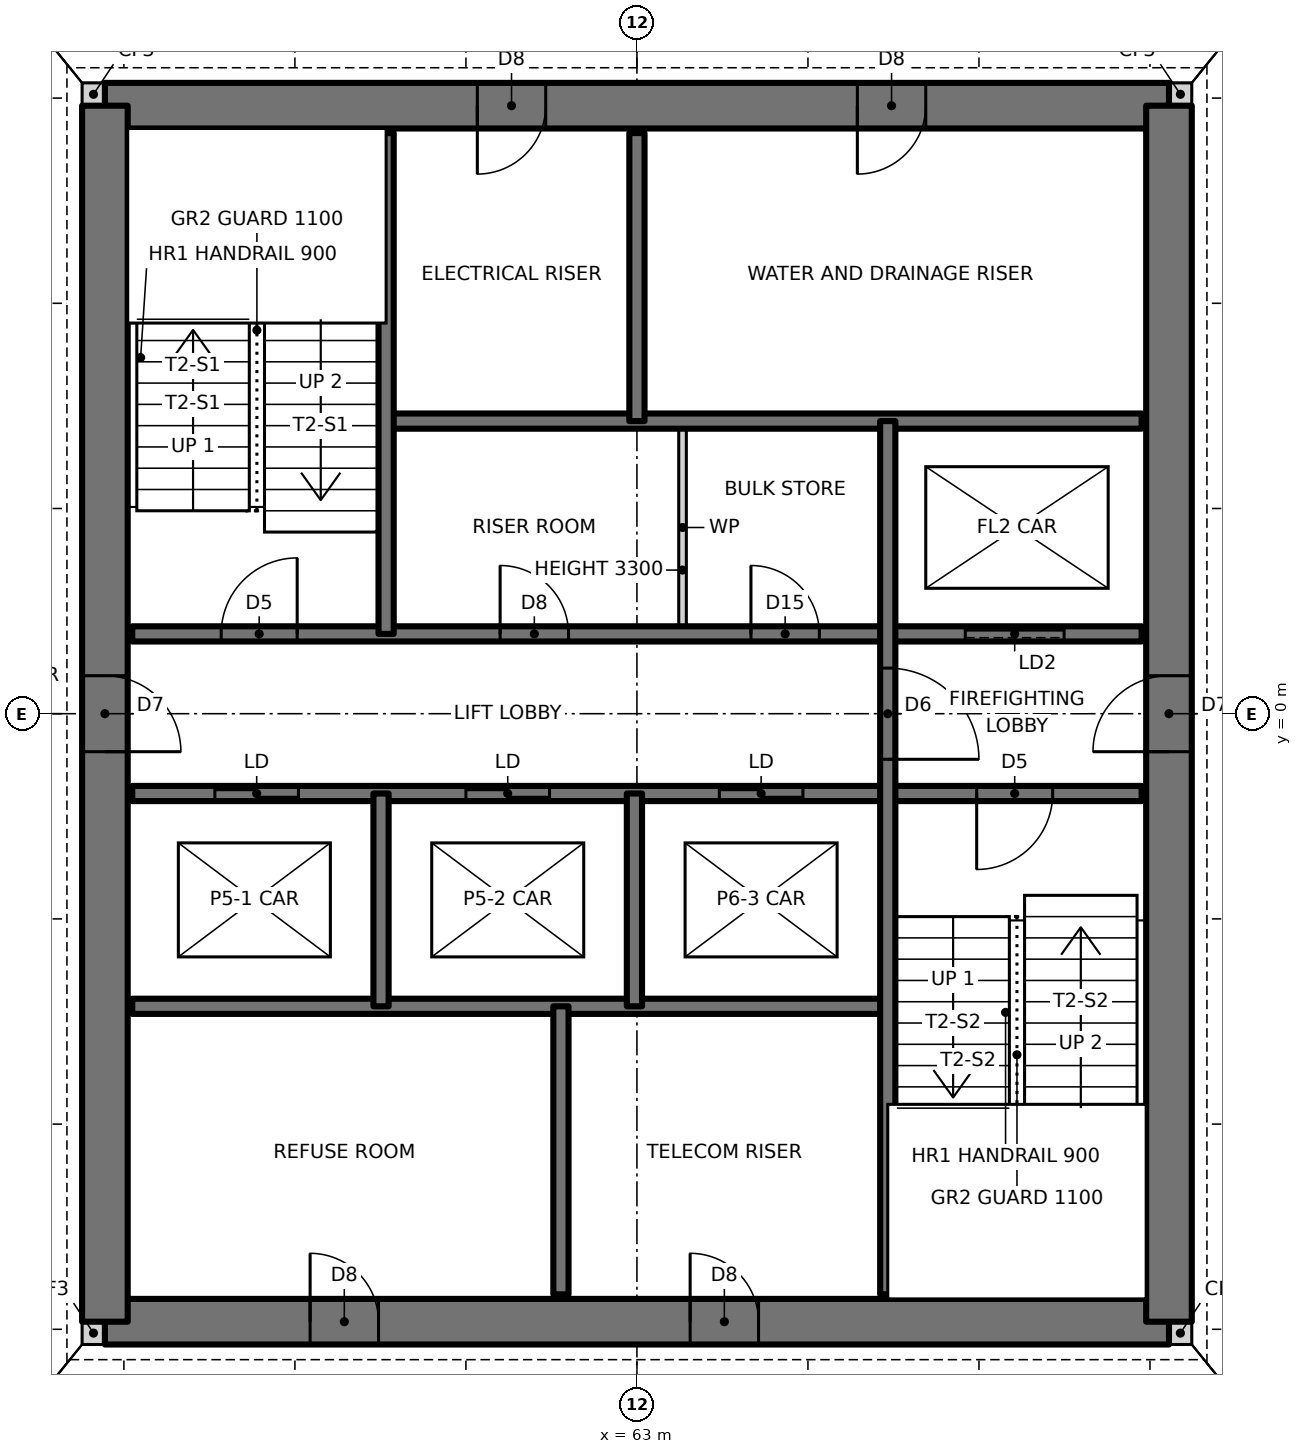
"""IFC4 building model, lengths in metres.
Left out: names, types, materials, properties, quantities, classifications, styles, units other than length and angle.
Written with IfcOpenShell. Run it as: python <this file> out.ifc"""

import sys

from ifc_helpers import new_model, si_unit, direction, frame, frame_2d, origin, place, context, subcontext, project, spatial, rectangle, extrude, element, fill, save


model = new_model("IFC4")
c1 = context("Model", 3, precision=1e-05, world=origin(), true_north=direction((0.0, 1.0)))
c2 = subcontext(c1, "Body", "Model", "MODEL_VIEW")
j1 = project(units=[si_unit("LENGTHUNIT", "METRE"), si_unit("PLANEANGLEUNIT", "RADIAN")], contexts=[c1])
p1 = place(None, origin())
s1 = spatial("IfcSite", under=j1, at=p1, CompositionType="ELEMENT")
p2 = place(p1, origin())
s2 = spatial("IfcBuilding", under=s1, at=p2, CompositionType="ELEMENT")
p3 = place(p2, frame((0.0, 0.0, 91.0)))
s3 = spatial("IfcBuildingStorey", under=s2, at=p3, CompositionType="ELEMENT", Elevation=91.0)
for number, where, z_axis, x_axis in (
    (1, (55.7, -8.15, 0.0), (0.0, 0.0, 1.0), (1.0, 0.0, 0.0)),
    (2, (70.0, -8.15, 0.0), (0.0, 0.0, 1.0), (1.0, 0.0, 0.0)),
    (3, (70.0, 8.15, 0.0), (0.0, 0.0, 1.0), (1.0, 0.0, 0.0)),
    (4, (55.7, 8.15, 0.0), (0.0, 0.0, 1.0), (1.0, 0.0, 0.0)),
):
    element("IfcWall", number, at=place(p3, frame(where, z_axis=z_axis, x_axis=x_axis)), inside=s3, PredefinedType="SOLIDWALL", context=c2, shape_type="SweptSolid", body=[
        extrude(rectangle(XDim=0.3, YDim=0.3, at=frame_2d((0.15, 0.0))), origin(), (0.0, 0.0, 1.0), 3.5),
    ])
p4 = place(p3, frame((56.0, -8.0, 0.0), z_axis=(0.0, 0.0, 1.0), x_axis=(1.0, 0.0, 0.0)))
e5 = element("IfcWall", 5, at=p4, inside=s3, PredefinedType="SHEAR", context=c2, shape_type="SweptSolid", body=[
    extrude(rectangle(XDim=14.0, YDim=0.6, at=frame_2d((7.0, 0.0))), origin(), (0.0, 0.0, 1.0), 3.5),
])
p5 = place(p4, frame((2.7, 0.0, 0.0)))
e6 = element("IfcOpeningElement", 6, at=p5, cuts=e5, PredefinedType="OPENING", context=c2, shape_type="SweptSolid", body=[
    extrude(rectangle(XDim=0.9, YDim=2.1, at=frame_2d((0.45, 1.05))), frame((0.0, 0.31, 0.0), z_axis=(0.0, -1.0, 0.0), x_axis=(1.0, 0.0, 0.0)), (0.0, 0.0, 1.0), 0.62),
])
p6 = place(p4, frame((7.7, 0.0, 0.0)))
e7 = element("IfcOpeningElement", 7, at=p6, cuts=e5, PredefinedType="OPENING", context=c2, shape_type="SweptSolid", body=[
    extrude(rectangle(XDim=0.9, YDim=2.1, at=frame_2d((0.45, 1.05))), frame((0.0, 0.31, 0.0), z_axis=(0.0, -1.0, 0.0), x_axis=(1.0, 0.0, 0.0)), (0.0, 0.0, 1.0), 0.62),
])
p7 = place(p3, frame((70.0, 8.0, 0.0), z_axis=(0.0, 0.0, 1.0), x_axis=(-1.0, 0.0, 0.0)))
e8 = element("IfcWall", 8, at=p7, inside=s3, PredefinedType="SHEAR", context=c2, shape_type="SweptSolid", body=[
    extrude(rectangle(XDim=14.0, YDim=0.6, at=frame_2d((7.0, 0.0))), origin(), (0.0, 0.0, 1.0), 3.5),
])
p8 = place(p7, frame((8.2, 0.0, 0.0)))
e9 = element("IfcOpeningElement", 9, at=p8, cuts=e8, PredefinedType="OPENING", context=c2, shape_type="SweptSolid", body=[
    extrude(rectangle(XDim=0.9, YDim=2.1, at=frame_2d((0.45, 1.05))), frame((0.0, 0.31, 0.0), z_axis=(0.0, -1.0, 0.0), x_axis=(1.0, 0.0, 0.0)), (0.0, 0.0, 1.0), 0.62),
])
p9 = place(p7, frame((3.2, 0.0, 0.0)))
e10 = element("IfcOpeningElement", 10, at=p9, cuts=e8, PredefinedType="OPENING", context=c2, shape_type="SweptSolid", body=[
    extrude(rectangle(XDim=0.9, YDim=2.1, at=frame_2d((0.45, 1.05))), frame((0.0, 0.31, 0.0), z_axis=(0.0, -1.0, 0.0), x_axis=(1.0, 0.0, 0.0)), (0.0, 0.0, 1.0), 0.62),
])
p10 = place(p3, frame((70.0, -8.0, 0.0), z_axis=(0.0, 0.0, 1.0), x_axis=(0.0, 1.0, 0.0)))
e11 = element("IfcWall", 11, at=p10, inside=s3, PredefinedType="SHEAR", context=c2, shape_type="SweptSolid", body=[
    extrude(rectangle(XDim=16.0, YDim=0.6, at=frame_2d((8.0, 0.0))), origin(), (0.0, 0.0, 1.0), 3.5),
])
p11 = place(p10, frame((7.5, 0.0, 0.0)))
e12 = element("IfcOpeningElement", 12, at=p11, cuts=e11, PredefinedType="OPENING", context=c2, shape_type="SweptSolid", body=[
    extrude(rectangle(XDim=1.0, YDim=2.1, at=frame_2d((0.5, 1.05))), frame((0.0, 0.31, 0.0), z_axis=(0.0, -1.0, 0.0), x_axis=(1.0, 0.0, 0.0)), (0.0, 0.0, 1.0), 0.62),
])
p12 = place(p3, frame((56.0, 8.0, 0.0), z_axis=(0.0, 0.0, 1.0), x_axis=(0.0, -1.0, 0.0)))
e13 = element("IfcWall", 13, at=p12, inside=s3, PredefinedType="SHEAR", context=c2, shape_type="SweptSolid", body=[
    extrude(rectangle(XDim=16.0, YDim=0.6, at=frame_2d((8.0, 0.0))), origin(), (0.0, 0.0, 1.0), 3.5),
])
p13 = place(p12, frame((7.5, 0.0, 0.0)))
e14 = element("IfcOpeningElement", 14, at=p13, cuts=e13, PredefinedType="OPENING", context=c2, shape_type="SweptSolid", body=[
    extrude(rectangle(XDim=1.0, YDim=2.1, at=frame_2d((0.5, 1.05))), frame((0.0, 0.31, 0.0), z_axis=(0.0, -1.0, 0.0), x_axis=(1.0, 0.0, 0.0)), (0.0, 0.0, 1.0), 0.62),
])
p14 = place(p3, frame((56.36, -3.85, 0.0), z_axis=(0.0, 0.0, 1.0), x_axis=(1.0, 0.0, 0.0)))
e15 = element("IfcWall", 15, at=p14, inside=s3, PredefinedType="SOLIDWALL", context=c2, shape_type="SweptSolid", body=[
    extrude(rectangle(XDim=9.94, YDim=0.2, at=frame_2d((4.97, 0.0))), origin(), (0.0, 0.0, 1.0), 3.5),
])
p15 = place(p3, frame((56.36, -1.05, 0.0), z_axis=(0.0, 0.0, 1.0), x_axis=(1.0, 0.0, 0.0)))
e16 = element("IfcWall", 16, at=p15, inside=s3, PredefinedType="SOLIDWALL", context=c2, shape_type="SweptSolid", body=[
    extrude(rectangle(XDim=13.28, YDim=0.2, at=frame_2d((6.64, 0.0))), origin(), (0.0, 0.0, 1.0), 3.5),
])
p16 = place(p15, frame((11.11, 0.0, 0.0)))
e17 = element("IfcOpeningElement", 17, at=p16, cuts=e16, PredefinedType="OPENING", context=c2, shape_type="SweptSolid", body=[
    extrude(rectangle(XDim=1.0, YDim=2.1, at=frame_2d((0.5, 1.05))), frame((0.0, 0.11, 0.0), z_axis=(0.0, -1.0, 0.0), x_axis=(1.0, 0.0, 0.0)), (0.0, 0.0, 1.0), 0.22),
])
p17 = place(p15, frame((1.087, 0.0, 0.0)))
e18 = element("IfcOpeningElement", 18, at=p17, cuts=e16, PredefinedType="OPENING", context=c2, shape_type="SweptSolid", body=[
    extrude(rectangle(XDim=1.1, YDim=2.1, at=frame_2d((0.55, 1.05))), frame((0.0, 0.11, 0.0), z_axis=(0.0, -1.0, 0.0), x_axis=(1.0, 0.0, 0.0)), (0.0, 0.0, 1.0), 0.22),
])
p18 = place(p15, frame((4.39, 0.0, 0.0)))
e19 = element("IfcOpeningElement", 19, at=p18, cuts=e16, PredefinedType="OPENING", context=c2, shape_type="SweptSolid", body=[
    extrude(rectangle(XDim=1.1, YDim=2.1, at=frame_2d((0.55, 1.05))), frame((0.0, 0.11, 0.0), z_axis=(0.0, -1.0, 0.0), x_axis=(1.0, 0.0, 0.0)), (0.0, 0.0, 1.0), 0.22),
])
p19 = place(p15, frame((7.724, 0.0, 0.0)))
e20 = element("IfcOpeningElement", 20, at=p19, cuts=e16, PredefinedType="OPENING", context=c2, shape_type="SweptSolid", body=[
    extrude(rectangle(XDim=1.1, YDim=2.1, at=frame_2d((0.55, 1.05))), frame((0.0, 0.11, 0.0), z_axis=(0.0, -1.0, 0.0), x_axis=(1.0, 0.0, 0.0)), (0.0, 0.0, 1.0), 0.22),
])
p20 = place(p3, frame((56.36, 1.05, 0.0), z_axis=(0.0, 0.0, 1.0), x_axis=(1.0, 0.0, 0.0)))
e21 = element("IfcWall", 21, at=p20, inside=s3, PredefinedType="SOLIDWALL", context=c2, shape_type="SweptSolid", body=[
    extrude(rectangle(XDim=13.28, YDim=0.2, at=frame_2d((6.64, 0.0))), origin(), (0.0, 0.0, 1.0), 3.5),
])
p21 = place(p20, frame((1.17, 0.0, 0.0)))
e22 = element("IfcOpeningElement", 22, at=p21, cuts=e21, PredefinedType="OPENING", context=c2, shape_type="SweptSolid", body=[
    extrude(rectangle(XDim=1.0, YDim=2.1, at=frame_2d((0.5, 1.05))), frame((0.0, 0.11, 0.0), z_axis=(0.0, -1.0, 0.0), x_axis=(1.0, 0.0, 0.0)), (0.0, 0.0, 1.0), 0.22),
])
p22 = place(p20, frame((4.84, 0.0, 0.0)))
e23 = element("IfcOpeningElement", 23, at=p22, cuts=e21, PredefinedType="OPENING", context=c2, shape_type="SweptSolid", body=[
    extrude(rectangle(XDim=0.9, YDim=2.1, at=frame_2d((0.45, 1.05))), frame((0.0, 0.11, 0.0), z_axis=(0.0, -1.0, 0.0), x_axis=(1.0, 0.0, 0.0)), (0.0, 0.0, 1.0), 0.22),
])
p23 = place(p20, frame((8.14, 0.0, 0.0)))
e24 = element("IfcOpeningElement", 24, at=p23, cuts=e21, PredefinedType="OPENING", context=c2, shape_type="SweptSolid", body=[
    extrude(rectangle(XDim=0.9, YDim=2.1, at=frame_2d((0.45, 1.05))), frame((0.0, 0.11, 0.0), z_axis=(0.0, -1.0, 0.0), x_axis=(1.0, 0.0, 0.0)), (0.0, 0.0, 1.0), 0.22),
])
p24 = place(p20, frame((10.96, 0.0, 0.0)))
e25 = element("IfcOpeningElement", 25, at=p24, cuts=e21, PredefinedType="OPENING", context=c2, shape_type="SweptSolid", body=[
    extrude(rectangle(XDim=1.3, YDim=2.1, at=frame_2d((0.65, 1.05))), frame((0.0, 0.11, 0.0), z_axis=(0.0, -1.0, 0.0), x_axis=(1.0, 0.0, 0.0)), (0.0, 0.0, 1.0), 0.22),
])
p25 = place(p3, frame((59.7, 3.85, 0.0), z_axis=(0.0, 0.0, 1.0), x_axis=(1.0, 0.0, 0.0)))
e26 = element("IfcWall", 26, at=p25, inside=s3, PredefinedType="SOLIDWALL", context=c2, shape_type="SweptSolid", body=[
    extrude(rectangle(XDim=9.94, YDim=0.2, at=frame_2d((4.97, 0.0))), origin(), (0.0, 0.0, 1.0), 3.5),
])
p26 = place(p3, frame((66.3, -7.64, 0.0), z_axis=(0.0, 0.0, 1.0), x_axis=(0.0, 1.0, 0.0)))
e27 = element("IfcWall", 27, at=p26, inside=s3, PredefinedType="SOLIDWALL", context=c2, shape_type="SweptSolid", body=[
    extrude(rectangle(XDim=11.49, YDim=0.2, at=frame_2d((5.745, 0.0))), origin(), (0.0, 0.0, 1.0), 3.5),
])
p27 = place(p26, frame((7.04, 0.0, 0.0)))
e28 = element("IfcOpeningElement", 28, at=p27, cuts=e27, PredefinedType="OPENING", context=c2, shape_type="SweptSolid", body=[
    extrude(rectangle(XDim=1.2, YDim=2.1, at=frame_2d((0.6, 1.05))), frame((0.0, 0.11, 0.0), z_axis=(0.0, -1.0, 0.0), x_axis=(1.0, 0.0, 0.0)), (0.0, 0.0, 1.0), 0.22),
])
p28 = place(p3, frame((63.6, 1.05, 0.0), z_axis=(0.0, 0.0, 1.0), x_axis=(0.0, 1.0, 0.0)))
e29 = element("IfcWall", 29, at=p28, inside=s3, PredefinedType="PARTITIONING", context=c2, shape_type="SweptSolid", body=[
    extrude(rectangle(XDim=2.8, YDim=0.1, at=frame_2d((1.4, 0.0))), origin(), (0.0, 0.0, 1.0), 3.3),
])
p29 = place(p3, frame((63.0, 3.85, 0.0), z_axis=(0.0, 0.0, 1.0), x_axis=(0.0, 1.0, 0.0)))
e30 = element("IfcWall", 30, at=p29, inside=s3, PredefinedType="SOLIDWALL", context=c2, shape_type="SweptSolid", body=[
    extrude(rectangle(XDim=3.79, YDim=0.2, at=frame_2d((1.895, 0.0))), origin(), (0.0, 0.0, 1.0), 3.5),
])
p30 = place(p3, frame((62.967, -3.85, 0.0), z_axis=(0.0, 0.0, 1.0), x_axis=(0.0, 1.0, 0.0)))
e31 = element("IfcWall", 31, at=p30, inside=s3, PredefinedType="SOLIDWALL", context=c2, shape_type="SweptSolid", body=[
    extrude(rectangle(XDim=2.8, YDim=0.2, at=frame_2d((1.4, 0.0))), origin(), (0.0, 0.0, 1.0), 3.5),
])
p31 = place(p3, frame((62.0, -7.64, 0.0), z_axis=(0.0, 0.0, 1.0), x_axis=(0.0, 1.0, 0.0)))
e32 = element("IfcWall", 32, at=p31, inside=s3, PredefinedType="SOLIDWALL", context=c2, shape_type="SweptSolid", body=[
    extrude(rectangle(XDim=3.79, YDim=0.2, at=frame_2d((1.895, 0.0))), origin(), (0.0, 0.0, 1.0), 3.5),
])
p32 = place(p3, frame((59.7, 1.05, 0.0), z_axis=(0.0, 0.0, 1.0), x_axis=(0.0, 1.0, 0.0)))
e33 = element("IfcWall", 33, at=p32, inside=s3, PredefinedType="SOLIDWALL", context=c2, shape_type="SweptSolid", body=[
    extrude(rectangle(XDim=6.59, YDim=0.2, at=frame_2d((3.295, 0.0))), origin(), (0.0, 0.0, 1.0), 3.5),
])
p33 = place(p3, frame((59.633, -3.85, 0.0), z_axis=(0.0, 0.0, 1.0), x_axis=(0.0, 1.0, 0.0)))
e34 = element("IfcWall", 34, at=p33, inside=s3, PredefinedType="SOLIDWALL", context=c2, shape_type="SweptSolid", body=[
    extrude(rectangle(XDim=2.8, YDim=0.2, at=frame_2d((1.4, 0.0))), origin(), (0.0, 0.0, 1.0), 3.5),
])
p34 = place(p21, origin())
e35 = element("IfcDoor", 35, at=p34, inside=s3, OperationType="SINGLE_SWING_RIGHT", PredefinedType="DOOR", context=c2, shape_type="SweptSolid", body=[
    extrude(rectangle(XDim=1.0, YDim=2.1, at=frame_2d((0.5, 1.05))), frame((0.0, 0.025, 0.0), z_axis=(0.0, -1.0, 0.0), x_axis=(1.0, 0.0, 0.0)), (0.0, 0.0, 1.0), 0.05),
])
fill(e22, e35)
p35 = place(p16, frame((1.0, 0.0, 0.0), z_axis=(0.0, 0.0, 1.0), x_axis=(-1.0, 0.0, 0.0)))
e36 = element("IfcDoor", 36, at=p35, inside=s3, OperationType="SINGLE_SWING_RIGHT", PredefinedType="DOOR", context=c2, shape_type="SweptSolid", body=[
    extrude(rectangle(XDim=1.0, YDim=2.1, at=frame_2d((0.5, 1.05))), frame((0.0, 0.025, 0.0), z_axis=(0.0, -1.0, 0.0), x_axis=(1.0, 0.0, 0.0)), (0.0, 0.0, 1.0), 0.05),
])
fill(e17, e36)
p36 = place(p27, frame((1.2, 0.0, 0.0), z_axis=(0.0, 0.0, 1.0), x_axis=(-1.0, 0.0, 0.0)))
e37 = element("IfcDoor", 37, at=p36, inside=s3, OperationType="SINGLE_SWING_RIGHT", PredefinedType="DOOR", context=c2, shape_type="SweptSolid", body=[
    extrude(rectangle(XDim=1.2, YDim=2.1, at=frame_2d((0.6, 1.05))), frame((0.0, 0.025, 0.0), z_axis=(0.0, -1.0, 0.0), x_axis=(1.0, 0.0, 0.0)), (0.0, 0.0, 1.0), 0.05),
])
fill(e28, e37)
p37 = place(p22, origin())
e38 = element("IfcDoor", 38, at=p37, inside=s3, OperationType="SINGLE_SWING_LEFT", PredefinedType="DOOR", context=c2, shape_type="SweptSolid", body=[
    extrude(rectangle(XDim=0.9, YDim=2.1, at=frame_2d((0.45, 1.05))), frame((0.0, 0.025, 0.0), z_axis=(0.0, -1.0, 0.0), x_axis=(1.0, 0.0, 0.0)), (0.0, 0.0, 1.0), 0.05),
])
fill(e23, e38)
p38 = place(p23, origin())
e39 = element("IfcDoor", 39, at=p38, inside=s3, OperationType="SINGLE_SWING_LEFT", PredefinedType="DOOR", context=c2, shape_type="SweptSolid", body=[
    extrude(rectangle(XDim=0.9, YDim=2.1, at=frame_2d((0.45, 1.05))), frame((0.0, 0.025, 0.0), z_axis=(0.0, -1.0, 0.0), x_axis=(1.0, 0.0, 0.0)), (0.0, 0.0, 1.0), 0.05),
])
fill(e24, e39)
p39 = place(p13, origin())
e40 = element("IfcDoor", 40, at=p39, inside=s3, OperationType="SINGLE_SWING_RIGHT", PredefinedType="DOOR", context=c2, shape_type="SweptSolid", body=[
    extrude(rectangle(XDim=1.0, YDim=2.1, at=frame_2d((0.5, 1.05))), frame((0.0, 0.025, 0.0), z_axis=(0.0, -1.0, 0.0), x_axis=(1.0, 0.0, 0.0)), (0.0, 0.0, 1.0), 0.05),
])
fill(e14, e40)
p40 = place(p11, origin())
e41 = element("IfcDoor", 41, at=p40, inside=s3, OperationType="SINGLE_SWING_LEFT", PredefinedType="DOOR", context=c2, shape_type="SweptSolid", body=[
    extrude(rectangle(XDim=1.0, YDim=2.1, at=frame_2d((0.5, 1.05))), frame((0.0, 0.025, 0.0), z_axis=(0.0, -1.0, 0.0), x_axis=(1.0, 0.0, 0.0)), (0.0, 0.0, 1.0), 0.05),
])
fill(e12, e41)
p41 = place(p8, origin())
e42 = element("IfcDoor", 42, at=p41, inside=s3, OperationType="SINGLE_SWING_RIGHT", PredefinedType="DOOR", context=c2, shape_type="SweptSolid", body=[
    extrude(rectangle(XDim=0.9, YDim=2.1, at=frame_2d((0.45, 1.05))), frame((0.0, 0.025, 0.0), z_axis=(0.0, -1.0, 0.0), x_axis=(1.0, 0.0, 0.0)), (0.0, 0.0, 1.0), 0.05),
])
fill(e9, e42)
p42 = place(p9, origin())
e43 = element("IfcDoor", 43, at=p42, inside=s3, OperationType="SINGLE_SWING_RIGHT", PredefinedType="DOOR", context=c2, shape_type="SweptSolid", body=[
    extrude(rectangle(XDim=0.9, YDim=2.1, at=frame_2d((0.45, 1.05))), frame((0.0, 0.025, 0.0), z_axis=(0.0, -1.0, 0.0), x_axis=(1.0, 0.0, 0.0)), (0.0, 0.0, 1.0), 0.05),
])
fill(e10, e43)
p43 = place(p5, origin())
e44 = element("IfcDoor", 44, at=p43, inside=s3, OperationType="SINGLE_SWING_LEFT", PredefinedType="DOOR", context=c2, shape_type="SweptSolid", body=[
    extrude(rectangle(XDim=0.9, YDim=2.1, at=frame_2d((0.45, 1.05))), frame((0.0, 0.025, 0.0), z_axis=(0.0, -1.0, 0.0), x_axis=(1.0, 0.0, 0.0)), (0.0, 0.0, 1.0), 0.05),
])
fill(e6, e44)
p44 = place(p6, origin())
e45 = element("IfcDoor", 45, at=p44, inside=s3, OperationType="SINGLE_SWING_LEFT", PredefinedType="DOOR", context=c2, shape_type="SweptSolid", body=[
    extrude(rectangle(XDim=0.9, YDim=2.1, at=frame_2d((0.45, 1.05))), frame((0.0, 0.025, 0.0), z_axis=(0.0, -1.0, 0.0), x_axis=(1.0, 0.0, 0.0)), (0.0, 0.0, 1.0), 0.05),
])
fill(e7, e45)
p45 = place(p17, origin())
e46 = element("IfcDoor", 46, at=p45, inside=s3, OperationType="DOUBLE_DOOR_SLIDING", PredefinedType="DOOR", context=c2, shape_type="SweptSolid", body=[
    extrude(rectangle(XDim=1.1, YDim=2.1, at=frame_2d((0.55, 1.05))), frame((0.0, 0.025, 0.0), z_axis=(0.0, -1.0, 0.0), x_axis=(1.0, 0.0, 0.0)), (0.0, 0.0, 1.0), 0.05),
])
fill(e18, e46)
p46 = place(p18, origin())
e47 = element("IfcDoor", 47, at=p46, inside=s3, OperationType="DOUBLE_DOOR_SLIDING", PredefinedType="DOOR", context=c2, shape_type="SweptSolid", body=[
    extrude(rectangle(XDim=1.1, YDim=2.1, at=frame_2d((0.55, 1.05))), frame((0.0, 0.025, 0.0), z_axis=(0.0, -1.0, 0.0), x_axis=(1.0, 0.0, 0.0)), (0.0, 0.0, 1.0), 0.05),
])
fill(e19, e47)
p47 = place(p19, origin())
e48 = element("IfcDoor", 48, at=p47, inside=s3, OperationType="DOUBLE_DOOR_SLIDING", PredefinedType="DOOR", context=c2, shape_type="SweptSolid", body=[
    extrude(rectangle(XDim=1.1, YDim=2.1, at=frame_2d((0.55, 1.05))), frame((0.0, 0.025, 0.0), z_axis=(0.0, -1.0, 0.0), x_axis=(1.0, 0.0, 0.0)), (0.0, 0.0, 1.0), 0.05),
])
fill(e20, e48)
p48 = place(p24, origin())
e49 = element("IfcDoor", 49, at=p48, inside=s3, OperationType="SLIDING_TO_LEFT", PredefinedType="DOOR", context=c2, shape_type="SweptSolid", body=[
    extrude(rectangle(XDim=1.3, YDim=2.1, at=frame_2d((0.65, 1.05))), frame((0.0, 0.025, 0.0), z_axis=(0.0, -1.0, 0.0), x_axis=(1.0, 0.0, 0.0)), (0.0, 0.0, 1.0), 0.05),
])
fill(e25, e49)
save(model, sys.argv[1])
